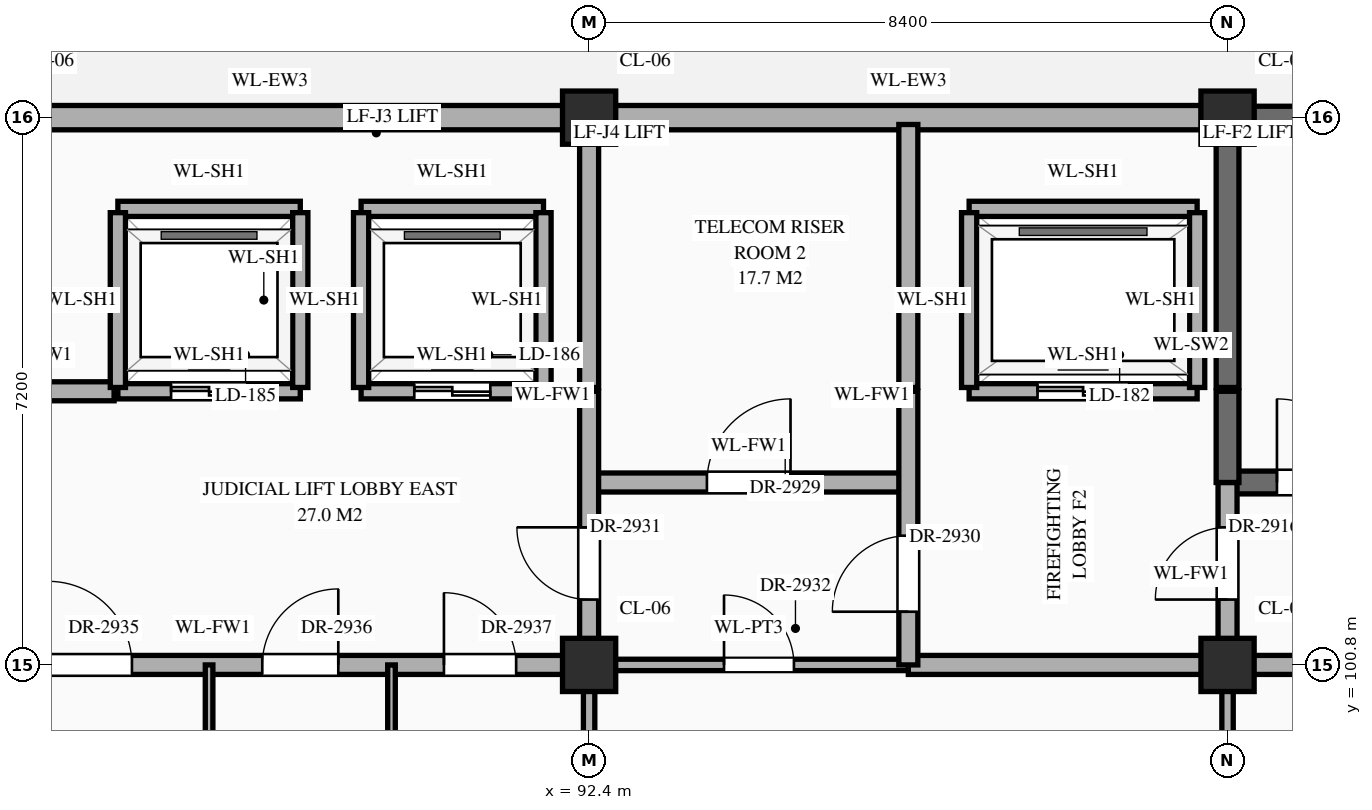
"""IFC4 building model, lengths in metres.
Left out: names, types, materials, properties, quantities, classifications, styles, units other than length and angle.
Written with IfcOpenShell. Run it as: python <this file> out.ifc"""

import sys

from ifc_helpers import new_model, si_unit, direction, frame, frame_2d, origin, origin_2d, place, context, subcontext, project, spatial, rectangle, extrude, element, fill, save


model = new_model("IFC4")
c1 = context("Model", 3, precision=1e-05, world=origin(), true_north=direction((0.0, 1.0)))
c2 = subcontext(c1, "Body", "Model", "MODEL_VIEW")
j1 = project(units=[si_unit("LENGTHUNIT", "METRE"), si_unit("PLANEANGLEUNIT", "RADIAN")], contexts=[c1])
p1 = place(None, origin())
s1 = spatial("IfcSite", under=j1, at=p1, CompositionType="ELEMENT")
p2 = place(p1, origin())
s2 = spatial("IfcBuilding", under=s1, at=p2, CompositionType="ELEMENT")
p3 = place(p2, frame((0.0, 0.0, 47.7)))
s3 = spatial("IfcBuildingStorey", under=s2, at=p3, CompositionType="ELEMENT", Elevation=47.7)
for number, where, z_axis, x_axis in (
    (1, (92.4, 100.8, 0.0), (0.0, 0.0, 1.0), (1.0, 0.0, 0.0)),
    (2, (92.4, 108.0, 0.0), (0.0, 0.0, 1.0), (1.0, 0.0, 0.0)),
    (3, (100.8, 100.8, 0.0), (0.0, 0.0, 1.0), (1.0, 0.0, 0.0)),
    (4, (100.8, 108.0, 0.0), (0.0, 0.0, 1.0), (1.0, 0.0, 0.0)),
):
    element("IfcColumn", number, at=place(p3, frame(where, z_axis=z_axis, x_axis=x_axis)), inside=s3, PredefinedType="COLUMN", context=c2, shape_type="SweptSolid", body=[
        extrude(rectangle(XDim=0.7, YDim=0.7, at=origin_2d()), origin(), (0.0, 0.0, 1.0), 4.2),
    ])
for number, where, z_axis, x_axis in (
    (5, (84.345, 108.0, 0.0), (0.0, 0.0, 1.0), (1.0, 0.0, 0.0)),
    (6, (92.745, 108.0, 0.0), (0.0, 0.0, 1.0), (1.0, 0.0, 0.0)),
):
    element("IfcWall", number, at=place(p3, frame(where, z_axis=z_axis, x_axis=x_axis)), inside=s3, PredefinedType="STANDARD", context=c2, shape_type="SweptSolid", body=[
        extrude(rectangle(XDim=7.71, YDim=0.32, at=frame_2d((3.855, 0.0))), origin(), (0.0, 0.0, 1.0), 3.31),
    ])
p4 = place(p3, frame((101.145, 108.0, 0.0), z_axis=(0.0, 0.0, 1.0), x_axis=(1.0, 0.0, 0.0)))
e7 = element("IfcWall", 7, at=p4, inside=s3, PredefinedType="SHEAR", context=c2, shape_type="SweptSolid", body=[
    extrude(rectangle(XDim=7.71, YDim=0.3, at=frame_2d((3.855, 0.0))), origin(), (0.0, 0.0, 1.0), 3.96),
])
p5 = place(p3, frame((75.6, 100.8, 0.0), z_axis=(0.0, 0.0, 1.0), x_axis=(1.0, 0.0, 0.0)))
e8 = element("IfcWall", 8, at=p5, inside=s3, PredefinedType="STANDARD", context=c2, shape_type="SweptSolid", body=[
    extrude(rectangle(XDim=16.8, YDim=0.25, at=frame_2d((8.4, 0.0))), origin(), (0.0, 0.0, 1.0), 3.11),
])
p6 = place(p5, frame((3.725, 0.0, 0.0)))
e9 = element("IfcOpeningElement", 9, at=p6, cuts=e8, PredefinedType="OPENING", context=c2, shape_type="SweptSolid", body=[
    extrude(rectangle(XDim=0.95, YDim=2.15, at=frame_2d((0.475, 1.075))), frame((0.0, 0.137, 0.0), z_axis=(0.0, -1.0, 0.0), x_axis=(1.0, 0.0, 0.0)), (0.0, 0.0, 1.0), 0.274),
])
p7 = place(p5, frame((9.685, 0.0, 0.0)))
e10 = element("IfcOpeningElement", 10, at=p7, cuts=e8, PredefinedType="OPENING", context=c2, shape_type="SweptSolid", body=[
    extrude(rectangle(XDim=1.1, YDim=2.2, at=frame_2d((0.55, 1.1))), frame((0.0, 0.137, 0.0), z_axis=(0.0, -1.0, 0.0), x_axis=(1.0, 0.0, 0.0)), (0.0, 0.0, 1.0), 0.274),
])
p8 = place(p5, frame((12.5, 0.0, 0.0)))
e11 = element("IfcOpeningElement", 11, at=p8, cuts=e8, PredefinedType="OPENING", context=c2, shape_type="SweptSolid", body=[
    extrude(rectangle(XDim=1.0, YDim=2.2, at=frame_2d((0.5, 1.1))), frame((0.0, 0.137, 0.0), z_axis=(0.0, -1.0, 0.0), x_axis=(1.0, 0.0, 0.0)), (0.0, 0.0, 1.0), 0.274),
])
p9 = place(p5, frame((14.89, 0.0, 0.0)))
e12 = element("IfcOpeningElement", 12, at=p9, cuts=e8, PredefinedType="OPENING", context=c2, shape_type="SweptSolid", body=[
    extrude(rectangle(XDim=0.95, YDim=2.15, at=frame_2d((0.475, 1.075))), frame((0.0, 0.137, 0.0), z_axis=(0.0, -1.0, 0.0), x_axis=(1.0, 0.0, 0.0)), (0.0, 0.0, 1.0), 0.274),
])
p10 = place(p3, frame((92.4, 100.8, 0.0), z_axis=(0.0, 0.0, 1.0), x_axis=(1.0, 0.0, 0.0)))
e13 = element("IfcWall", 13, at=p10, inside=s3, PredefinedType="STANDARD", context=c2, shape_type="SweptSolid", body=[
    extrude(rectangle(XDim=4.2, YDim=0.15, at=frame_2d((2.1, 0.0))), origin(), (0.0, 0.0, 1.0), 3.11),
])
p11 = place(p10, frame((1.775, 0.0, 0.0)))
e14 = element("IfcOpeningElement", 14, at=p11, cuts=e13, PredefinedType="OPENING", context=c2, shape_type="SweptSolid", body=[
    extrude(rectangle(XDim=0.92, YDim=2.15, at=frame_2d((0.46, 1.075))), frame((0.0, 0.087, 0.0), z_axis=(0.0, -1.0, 0.0), x_axis=(1.0, 0.0, 0.0)), (0.0, 0.0, 1.0), 0.174),
])
p12 = place(p3, frame((96.6, 100.8, 0.0), z_axis=(0.0, 0.0, 1.0), x_axis=(1.0, 0.0, 0.0)))
e15 = element("IfcWall", 15, at=p12, inside=s3, PredefinedType="STANDARD", context=c2, shape_type="SweptSolid", body=[
    extrude(rectangle(XDim=12.6, YDim=0.25, at=frame_2d((6.3, 0.0))), origin(), (0.0, 0.0, 1.0), 3.11),
])
p13 = place(p12, frame((7.9, 0.0, 0.0)))
e16 = element("IfcOpeningElement", 16, at=p13, cuts=e15, PredefinedType="OPENING", context=c2, shape_type="SweptSolid", body=[
    extrude(rectangle(XDim=1.0, YDim=2.2, at=frame_2d((0.5, 1.1))), frame((0.0, 0.137, 0.0), z_axis=(0.0, -1.0, 0.0), x_axis=(1.0, 0.0, 0.0)), (0.0, 0.0, 1.0), 0.274),
])
p14 = place(p3, frame((92.4, 103.2, 0.0), z_axis=(0.0, 0.0, 1.0), x_axis=(1.0, 0.0, 0.0)))
e17 = element("IfcWall", 17, at=p14, inside=s3, PredefinedType="STANDARD", context=c2, shape_type="SweptSolid", body=[
    extrude(rectangle(XDim=4.2, YDim=0.25, at=frame_2d((2.1, 0.0))), origin(), (0.0, 0.0, 1.0), 3.96),
])
p15 = place(p14, frame((1.55, 0.0, 0.0)))
e18 = element("IfcOpeningElement", 18, at=p15, cuts=e17, PredefinedType="OPENING", context=c2, shape_type="SweptSolid", body=[
    extrude(rectangle(XDim=1.1, YDim=2.2, at=frame_2d((0.55, 1.1))), frame((0.0, 0.137, 0.0), z_axis=(0.0, -1.0, 0.0), x_axis=(1.0, 0.0, 0.0)), (0.0, 0.0, 1.0), 0.274),
])
p16 = place(p3, frame((100.8, 103.2, 0.0), z_axis=(0.0, 0.0, 1.0), x_axis=(1.0, 0.0, 0.0)))
e19 = element("IfcWall", 19, at=p16, inside=s3, PredefinedType="SHEAR", context=c2, shape_type="SweptSolid", body=[
    extrude(rectangle(XDim=8.4, YDim=0.3, at=frame_2d((4.2, 0.0))), origin(), (0.0, 0.0, 1.0), 3.96),
])
p17 = place(p16, frame((0.65, 0.0, 0.0)))
e20 = element("IfcOpeningElement", 20, at=p17, cuts=e19, PredefinedType="OPENING", context=c2, shape_type="SweptSolid", body=[
    extrude(rectangle(XDim=1.1, YDim=2.2, at=frame_2d((0.55, 1.1))), frame((0.0, 0.162, 0.0), z_axis=(0.0, -1.0, 0.0), x_axis=(1.0, 0.0, 0.0)), (0.0, 0.0, 1.0), 0.324),
])
p18 = place(p3, frame((84.05, 104.4, 0.0), z_axis=(0.0, 0.0, 1.0), x_axis=(1.0, 0.0, 0.0)))
e21 = element("IfcWall", 21, at=p18, inside=s3, PredefinedType="STANDARD", context=c2, shape_type="SweptSolid", body=[
    extrude(rectangle(XDim=2.1, YDim=0.25, at=frame_2d((1.05, 0.0))), origin(), (0.0, 0.0, 1.0), 3.96),
])
p19 = place(p3, frame((86.2, 104.4, 0.0), z_axis=(0.0, 0.0, 1.0), x_axis=(1.0, 0.0, 0.0)))
e22 = element("IfcWall", 22, at=p19, inside=s3, PredefinedType="STANDARD", context=c2, shape_type="SweptSolid", body=[
    extrude(rectangle(XDim=2.4, YDim=0.2, at=frame_2d((1.2, 0.0))), origin(), (0.0, 0.0, 1.0), 3.96),
])
p20 = place(p19, frame((0.7, 0.0, 0.0)))
e23 = element("IfcOpeningElement", 23, at=p20, cuts=e22, PredefinedType="OPENING", context=c2, shape_type="SweptSolid", body=[
    extrude(rectangle(XDim=1.0, YDim=2.15, at=frame_2d((0.5, 1.075))), frame((0.0, 0.112, 0.0), z_axis=(0.0, -1.0, 0.0), x_axis=(1.0, 0.0, 0.0)), (0.0, 0.0, 1.0), 0.224),
])
p21 = place(p3, frame((89.4, 104.4, 0.0), z_axis=(0.0, 0.0, 1.0), x_axis=(1.0, 0.0, 0.0)))
e24 = element("IfcWall", 24, at=p21, inside=s3, PredefinedType="STANDARD", context=c2, shape_type="SweptSolid", body=[
    extrude(rectangle(XDim=2.4, YDim=0.2, at=frame_2d((1.2, 0.0))), origin(), (0.0, 0.0, 1.0), 3.96),
])
p22 = place(p21, frame((0.7, 0.0, 0.0)))
e25 = element("IfcOpeningElement", 25, at=p22, cuts=e24, PredefinedType="OPENING", context=c2, shape_type="SweptSolid", body=[
    extrude(rectangle(XDim=1.0, YDim=2.15, at=frame_2d((0.5, 1.075))), frame((0.0, 0.112, 0.0), z_axis=(0.0, -1.0, 0.0), x_axis=(1.0, 0.0, 0.0)), (0.0, 0.0, 1.0), 0.224),
])
p23 = place(p3, frame((97.4, 104.4, 0.0), z_axis=(0.0, 0.0, 1.0), x_axis=(1.0, 0.0, 0.0)))
e26 = element("IfcWall", 26, at=p23, inside=s3, PredefinedType="STANDARD", context=c2, shape_type="SweptSolid", body=[
    extrude(rectangle(XDim=3.0, YDim=0.2, at=frame_2d((1.5, 0.0))), origin(), (0.0, 0.0, 1.0), 3.96),
])
p24 = place(p23, frame((0.9, 0.0, 0.0)))
e27 = element("IfcOpeningElement", 27, at=p24, cuts=e26, PredefinedType="OPENING", context=c2, shape_type="SweptSolid", body=[
    extrude(rectangle(XDim=1.2, YDim=2.15, at=frame_2d((0.6, 1.075))), frame((0.0, 0.112, 0.0), z_axis=(0.0, -1.0, 0.0), x_axis=(1.0, 0.0, 0.0)), (0.0, 0.0, 1.0), 0.224),
])
for number, where, z_axis, x_axis in (
    (28, (86.2, 106.8, 0.0), (0.0, 0.0, 1.0), (1.0, 0.0, 0.0)),
    (29, (89.4, 106.8, 0.0), (0.0, 0.0, 1.0), (1.0, 0.0, 0.0)),
):
    element("IfcWall", number, at=place(p3, frame(where, z_axis=z_axis, x_axis=x_axis)), inside=s3, PredefinedType="STANDARD", context=c2, shape_type="SweptSolid", body=[
        extrude(rectangle(XDim=2.4, YDim=0.2, at=frame_2d((1.2, 0.0))), origin(), (0.0, 0.0, 1.0), 3.96),
    ])
p25 = place(p3, frame((97.4, 106.8, 0.0), z_axis=(0.0, 0.0, 1.0), x_axis=(1.0, 0.0, 0.0)))
e30 = element("IfcWall", 30, at=p25, inside=s3, PredefinedType="STANDARD", context=c2, shape_type="SweptSolid", body=[
    extrude(rectangle(XDim=3.0, YDim=0.2, at=frame_2d((1.5, 0.0))), origin(), (0.0, 0.0, 1.0), 3.96),
])
p26 = place(p3, frame((86.2, 104.45, 0.0), z_axis=(0.0, 0.0, 1.0), x_axis=(0.0, 1.0, 0.0)))
e31 = element("IfcWall", 31, at=p26, inside=s3, PredefinedType="STANDARD", context=c2, shape_type="SweptSolid", body=[
    extrude(rectangle(XDim=2.3, YDim=0.2, at=frame_2d((1.15, 0.0))), origin(), (0.0, 0.0, 1.0), 3.96),
])
p27 = place(p3, frame((87.4, 96.0, 0.0), z_axis=(0.0, 0.0, 1.0), x_axis=(0.0, 1.0, 0.0)))
e32 = element("IfcWall", 32, at=p27, inside=s3, PredefinedType="STANDARD", context=c2, shape_type="SweptSolid", body=[
    extrude(rectangle(XDim=4.8, YDim=0.1, at=frame_2d((2.4, 0.0))), origin(), (0.0, 0.0, 1.0), 3.96),
])
p28 = place(p27, frame((1.83, 0.0, 0.0)))
e33 = element("IfcOpeningElement", 33, at=p28, cuts=e32, PredefinedType="OPENING", context=c2, shape_type="SweptSolid", body=[
    extrude(rectangle(XDim=1.14, YDim=2.4, at=frame_2d((0.57, 1.2))), frame((0.0, 0.062, 0.0), z_axis=(0.0, -1.0, 0.0), x_axis=(1.0, 0.0, 0.0)), (0.0, 0.0, 1.0), 0.124),
])
for number, where, z_axis, x_axis in (
    (34, (88.6, 104.45, 0.0), (0.0, 0.0, 1.0), (0.0, 1.0, 0.0)),
    (35, (89.4, 104.45, 0.0), (0.0, 0.0, 1.0), (0.0, 1.0, 0.0)),
):
    element("IfcWall", number, at=place(p3, frame(where, z_axis=z_axis, x_axis=x_axis)), inside=s3, PredefinedType="STANDARD", context=c2, shape_type="SweptSolid", body=[
        extrude(rectangle(XDim=2.3, YDim=0.2, at=frame_2d((1.15, 0.0))), origin(), (0.0, 0.0, 1.0), 3.96),
    ])
p29 = place(p3, frame((89.8, 96.0, 0.0), z_axis=(0.0, 0.0, 1.0), x_axis=(0.0, 1.0, 0.0)))
e36 = element("IfcWall", 36, at=p29, inside=s3, PredefinedType="STANDARD", context=c2, shape_type="SweptSolid", body=[
    extrude(rectangle(XDim=4.8, YDim=0.1, at=frame_2d((2.4, 0.0))), origin(), (0.0, 0.0, 1.0), 3.96),
])
p30 = place(p29, frame((1.95, 0.0, 0.0)))
e37 = element("IfcOpeningElement", 37, at=p30, cuts=e36, PredefinedType="OPENING", context=c2, shape_type="SweptSolid", body=[
    extrude(rectangle(XDim=0.9, YDim=2.15, at=frame_2d((0.45, 1.075))), frame((0.0, 0.062, 0.0), z_axis=(0.0, -1.0, 0.0), x_axis=(1.0, 0.0, 0.0)), (0.0, 0.0, 1.0), 0.124),
])
p31 = place(p3, frame((91.8, 104.45, 0.0), z_axis=(0.0, 0.0, 1.0), x_axis=(0.0, 1.0, 0.0)))
e38 = element("IfcWall", 38, at=p31, inside=s3, PredefinedType="STANDARD", context=c2, shape_type="SweptSolid", body=[
    extrude(rectangle(XDim=2.3, YDim=0.2, at=frame_2d((1.15, 0.0))), origin(), (0.0, 0.0, 1.0), 3.96),
])
p32 = place(p3, frame((92.4, 96.0, 0.0), z_axis=(0.0, 0.0, 1.0), x_axis=(0.0, 1.0, 0.0)))
e39 = element("IfcWall", 39, at=p32, inside=s3, PredefinedType="STANDARD", context=c2, shape_type="SweptSolid", body=[
    extrude(rectangle(XDim=4.8, YDim=0.15, at=frame_2d((2.4, 0.0))), origin(), (0.0, 0.0, 1.0), 3.21),
])
p33 = place(p3, frame((92.4, 100.8, 0.0), z_axis=(0.0, 0.0, 1.0), x_axis=(0.0, 1.0, 0.0)))
e40 = element("IfcWall", 40, at=p33, inside=s3, PredefinedType="STANDARD", context=c2, shape_type="SweptSolid", body=[
    extrude(rectangle(XDim=3.6, YDim=0.25, at=frame_2d((1.8, 0.0))), origin(), (0.0, 0.0, 1.0), 3.21),
])
p34 = place(p33, frame((0.86, 0.0, 0.0)))
e41 = element("IfcOpeningElement", 41, at=p34, cuts=e40, PredefinedType="OPENING", context=c2, shape_type="SweptSolid", body=[
    extrude(rectangle(XDim=0.95, YDim=2.15, at=frame_2d((0.475, 1.075))), frame((0.0, 0.137, 0.0), z_axis=(0.0, -1.0, 0.0), x_axis=(1.0, 0.0, 0.0)), (0.0, 0.0, 1.0), 0.274),
])
p35 = place(p3, frame((92.4, 104.45, 0.0), z_axis=(0.0, 0.0, 1.0), x_axis=(0.0, 1.0, 0.0)))
e42 = element("IfcWall", 42, at=p35, inside=s3, PredefinedType="STANDARD", context=c2, shape_type="SweptSolid", body=[
    extrude(rectangle(XDim=3.46, YDim=0.25, at=frame_2d((1.73, 0.0))), origin(), (0.0, 0.0, 1.0), 3.21),
])
p36 = place(p3, frame((96.6, 100.8, 0.0), z_axis=(0.0, 0.0, 1.0), x_axis=(0.0, 1.0, 0.0)))
e43 = element("IfcWall", 43, at=p36, inside=s3, PredefinedType="STANDARD", context=c2, shape_type="SweptSolid", body=[
    extrude(rectangle(XDim=3.6, YDim=0.25, at=frame_2d((1.8, 0.0))), origin(), (0.0, 0.0, 1.0), 3.96),
])
p37 = place(p36, frame((0.7, 0.0, 0.0)))
e44 = element("IfcOpeningElement", 44, at=p37, cuts=e43, PredefinedType="OPENING", context=c2, shape_type="SweptSolid", body=[
    extrude(rectangle(XDim=1.0, YDim=2.2, at=frame_2d((0.5, 1.1))), frame((0.0, 0.137, 0.0), z_axis=(0.0, -1.0, 0.0), x_axis=(1.0, 0.0, 0.0)), (0.0, 0.0, 1.0), 0.274),
])
p38 = place(p3, frame((96.6, 104.45, 0.0), z_axis=(0.0, 0.0, 1.0), x_axis=(0.0, 1.0, 0.0)))
e45 = element("IfcWall", 45, at=p38, inside=s3, PredefinedType="STANDARD", context=c2, shape_type="SweptSolid", body=[
    extrude(rectangle(XDim=3.46, YDim=0.25, at=frame_2d((1.73, 0.0))), origin(), (0.0, 0.0, 1.0), 3.96),
])
for number, where, z_axis, x_axis in (
    (46, (97.4, 104.45, 0.0), (0.0, 0.0, 1.0), (0.0, 1.0, 0.0)),
    (47, (100.4, 104.45, 0.0), (0.0, 0.0, 1.0), (0.0, 1.0, 0.0)),
):
    element("IfcWall", number, at=place(p3, frame(where, z_axis=z_axis, x_axis=x_axis)), inside=s3, PredefinedType="STANDARD", context=c2, shape_type="SweptSolid", body=[
        extrude(rectangle(XDim=2.3, YDim=0.2, at=frame_2d((1.15, 0.0))), origin(), (0.0, 0.0, 1.0), 3.96),
    ])
p39 = place(p3, frame((100.8, 96.0, 0.0), z_axis=(0.0, 0.0, 1.0), x_axis=(0.0, 1.0, 0.0)))
e48 = element("IfcWall", 48, at=p39, inside=s3, PredefinedType="STANDARD", context=c2, shape_type="SweptSolid", body=[
    extrude(rectangle(XDim=4.8, YDim=0.15, at=frame_2d((2.4, 0.0))), origin(), (0.0, 0.0, 1.0), 3.21),
])
p40 = place(p3, frame((100.8, 100.8, 0.0), z_axis=(0.0, 0.0, 1.0), x_axis=(0.0, 1.0, 0.0)))
e49 = element("IfcWall", 49, at=p40, inside=s3, PredefinedType="STANDARD", context=c2, shape_type="SweptSolid", body=[
    extrude(rectangle(XDim=2.4, YDim=0.25, at=frame_2d((1.2, 0.0))), origin(), (0.0, 0.0, 1.0), 3.21),
])
p41 = place(p40, frame((0.86, 0.0, 0.0)))
e50 = element("IfcOpeningElement", 50, at=p41, cuts=e49, PredefinedType="OPENING", context=c2, shape_type="SweptSolid", body=[
    extrude(rectangle(XDim=0.95, YDim=2.15, at=frame_2d((0.475, 1.075))), frame((0.0, 0.137, 0.0), z_axis=(0.0, -1.0, 0.0), x_axis=(1.0, 0.0, 0.0)), (0.0, 0.0, 1.0), 0.274),
])
p42 = place(p3, frame((100.8, 103.2, 0.0), z_axis=(0.0, 0.0, 1.0), x_axis=(0.0, 1.0, 0.0)))
e51 = element("IfcWall", 51, at=p42, inside=s3, PredefinedType="SHEAR", context=c2, shape_type="SweptSolid", body=[
    extrude(rectangle(XDim=1.2, YDim=0.3, at=frame_2d((0.6, 0.0))), origin(), (0.0, 0.0, 1.0), 3.96),
])
p43 = place(p3, frame((100.8, 104.45, 0.0), z_axis=(0.0, 0.0, 1.0), x_axis=(0.0, 1.0, 0.0)))
e52 = element("IfcWall", 52, at=p43, inside=s3, PredefinedType="SHEAR", context=c2, shape_type="SweptSolid", body=[
    extrude(rectangle(XDim=3.46, YDim=0.3, at=frame_2d((1.73, 0.0))), origin(), (0.0, 0.0, 1.0), 3.96),
])
p44 = place(p24, origin())
e53 = element("IfcDoor", 53, at=p44, inside=s3, OperationType="DOUBLE_DOOR_SLIDING", PredefinedType="DOOR", context=c2, shape_type="SweptSolid", body=[
    extrude(rectangle(XDim=1.2, YDim=2.15, at=frame_2d((0.6, 1.075))), frame((0.0, 0.025, 0.0), z_axis=(0.0, -1.0, 0.0), x_axis=(1.0, 0.0, 0.0)), (0.0, 0.0, 1.0), 0.05),
])
fill(e27, e53)
p45 = place(p20, origin())
e54 = element("IfcDoor", 54, at=p45, inside=s3, OperationType="DOUBLE_DOOR_SLIDING", PredefinedType="DOOR", context=c2, shape_type="SweptSolid", body=[
    extrude(rectangle(XDim=1.0, YDim=2.15, at=frame_2d((0.5, 1.075))), frame((0.0, 0.025, 0.0), z_axis=(0.0, -1.0, 0.0), x_axis=(1.0, 0.0, 0.0)), (0.0, 0.0, 1.0), 0.05),
])
fill(e23, e54)
p46 = place(p22, origin())
e55 = element("IfcDoor", 55, at=p46, inside=s3, OperationType="DOUBLE_DOOR_SLIDING", PredefinedType="DOOR", context=c2, shape_type="SweptSolid", body=[
    extrude(rectangle(XDim=1.0, YDim=2.15, at=frame_2d((0.5, 1.075))), frame((0.0, 0.025, 0.0), z_axis=(0.0, -1.0, 0.0), x_axis=(1.0, 0.0, 0.0)), (0.0, 0.0, 1.0), 0.05),
])
fill(e25, e55)
p47 = place(p17, origin())
e56 = element("IfcDoor", 56, at=p47, inside=s3, OperationType="SINGLE_SWING_LEFT", PredefinedType="DOOR", context=c2, shape_type="SweptSolid", body=[
    extrude(rectangle(XDim=1.1, YDim=2.2, at=frame_2d((0.55, 1.1))), frame((0.0, 0.025, 0.0), z_axis=(0.0, -1.0, 0.0), x_axis=(1.0, 0.0, 0.0)), (0.0, 0.0, 1.0), 0.05),
])
fill(e20, e56)
p48 = place(p41, origin())
e57 = element("IfcDoor", 57, at=p48, inside=s3, OperationType="SINGLE_SWING_LEFT", PredefinedType="DOOR", context=c2, shape_type="SweptSolid", body=[
    extrude(rectangle(XDim=0.95, YDim=2.15, at=frame_2d((0.475, 1.075))), frame((0.0, 0.025, 0.0), z_axis=(0.0, -1.0, 0.0), x_axis=(1.0, 0.0, 0.0)), (0.0, 0.0, 1.0), 0.05),
])
fill(e50, e57)
p49 = place(p15, origin())
e58 = element("IfcDoor", 58, at=p49, inside=s3, OperationType="SINGLE_SWING_RIGHT", PredefinedType="DOOR", context=c2, shape_type="SweptSolid", body=[
    extrude(rectangle(XDim=1.1, YDim=2.2, at=frame_2d((0.55, 1.1))), frame((0.0, 0.025, 0.0), z_axis=(0.0, -1.0, 0.0), x_axis=(1.0, 0.0, 0.0)), (0.0, 0.0, 1.0), 0.05),
])
fill(e18, e58)
p50 = place(p37, origin())
e59 = element("IfcDoor", 59, at=p50, inside=s3, OperationType="SINGLE_SWING_LEFT", PredefinedType="DOOR", context=c2, shape_type="SweptSolid", body=[
    extrude(rectangle(XDim=1.0, YDim=2.2, at=frame_2d((0.5, 1.1))), frame((0.0, 0.025, 0.0), z_axis=(0.0, -1.0, 0.0), x_axis=(1.0, 0.0, 0.0)), (0.0, 0.0, 1.0), 0.05),
])
fill(e44, e59)
p51 = place(p34, origin())
e60 = element("IfcDoor", 60, at=p51, inside=s3, OperationType="SINGLE_SWING_RIGHT", PredefinedType="DOOR", context=c2, shape_type="SweptSolid", body=[
    extrude(rectangle(XDim=0.95, YDim=2.15, at=frame_2d((0.475, 1.075))), frame((0.0, 0.025, 0.0), z_axis=(0.0, -1.0, 0.0), x_axis=(1.0, 0.0, 0.0)), (0.0, 0.0, 1.0), 0.05),
])
fill(e41, e60)
p52 = place(p11, origin())
e61 = element("IfcDoor", 61, at=p52, inside=s3, OperationType="SINGLE_SWING_LEFT", PredefinedType="DOOR", context=c2, shape_type="SweptSolid", body=[
    extrude(rectangle(XDim=0.92, YDim=2.15, at=frame_2d((0.46, 1.075))), frame((0.0, 0.025, 0.0), z_axis=(0.0, -1.0, 0.0), x_axis=(1.0, 0.0, 0.0)), (0.0, 0.0, 1.0), 0.05),
])
fill(e14, e61)
p53 = place(p7, origin())
e62 = element("IfcDoor", 62, at=p53, inside=s3, OperationType="SINGLE_SWING_LEFT", PredefinedType="DOOR", context=c2, shape_type="SweptSolid", body=[
    extrude(rectangle(XDim=1.1, YDim=2.2, at=frame_2d((0.55, 1.1))), frame((0.0, 0.025, 0.0), z_axis=(0.0, -1.0, 0.0), x_axis=(1.0, 0.0, 0.0)), (0.0, 0.0, 1.0), 0.05),
])
fill(e10, e62)
p54 = place(p8, origin())
e63 = element("IfcDoor", 63, at=p54, inside=s3, OperationType="SINGLE_SWING_RIGHT", PredefinedType="DOOR", context=c2, shape_type="SweptSolid", body=[
    extrude(rectangle(XDim=1.0, YDim=2.2, at=frame_2d((0.5, 1.1))), frame((0.0, 0.025, 0.0), z_axis=(0.0, -1.0, 0.0), x_axis=(1.0, 0.0, 0.0)), (0.0, 0.0, 1.0), 0.05),
])
fill(e11, e63)
p55 = place(p9, origin())
e64 = element("IfcDoor", 64, at=p55, inside=s3, OperationType="SINGLE_SWING_LEFT", PredefinedType="DOOR", context=c2, shape_type="SweptSolid", body=[
    extrude(rectangle(XDim=0.95, YDim=2.15, at=frame_2d((0.475, 1.075))), frame((0.0, 0.025, 0.0), z_axis=(0.0, -1.0, 0.0), x_axis=(1.0, 0.0, 0.0)), (0.0, 0.0, 1.0), 0.05),
])
fill(e12, e64)
save(model, sys.argv[1])
